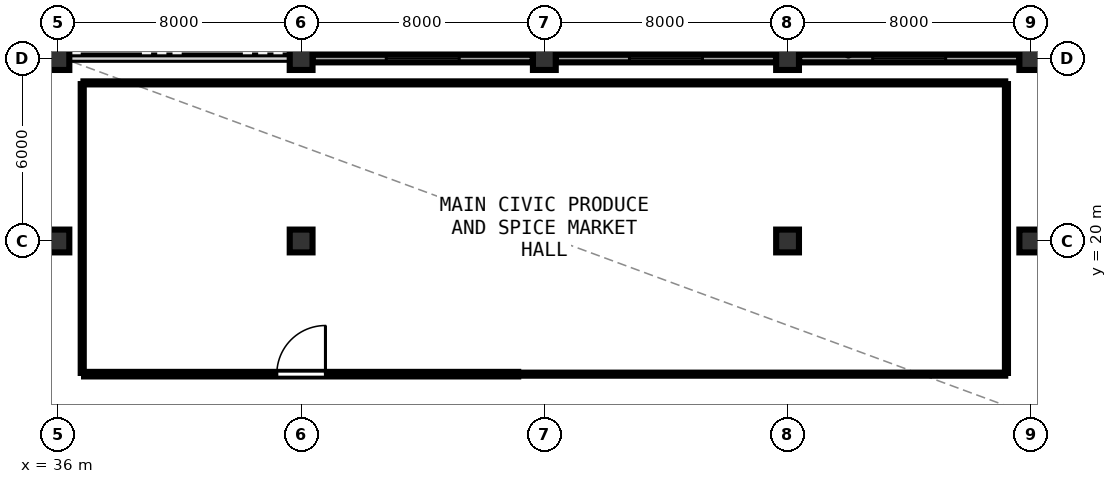
"""IFC4 building model, lengths in metres.
Left out: names, types, materials, properties, quantities, classifications, styles, units other than length and angle.
Written with IfcOpenShell. Run it as: python <this file> out.ifc"""

import sys

from ifc_helpers import new_model, si_unit, direction, frame, frame_2d, origin, origin_2d, place, context, subcontext, project, spatial, rectangle, extrude, element, fill, save


model = new_model("IFC4")
c1 = context("Model", 3, precision=1e-05, world=origin(), true_north=direction((0.0, 1.0)))
c2 = subcontext(c1, "Body", "Model", "MODEL_VIEW")
j1 = project(units=[si_unit("LENGTHUNIT", "METRE"), si_unit("PLANEANGLEUNIT", "RADIAN")], contexts=[c1])
p1 = place(None, origin())
s1 = spatial("IfcSite", under=j1, at=p1, CompositionType="ELEMENT")
p2 = place(p1, origin())
s2 = spatial("IfcBuilding", under=s1, at=p2, CompositionType="ELEMENT")
p3 = place(p2, origin())
s3 = spatial("IfcBuildingStorey", under=s2, at=p3, CompositionType="ELEMENT", Elevation=0.0)
for number, where, z_axis, x_axis in (
    (1, (36.0, 20.0, 0.0), (0.0, 0.0, 1.0), (1.0, 0.0, 0.0)),
    (2, (36.0, 26.0, 0.0), (0.0, 0.0, 1.0), (1.0, 0.0, 0.0)),
    (3, (44.0, 20.0, 0.0), (0.0, 0.0, 1.0), (1.0, 0.0, 0.0)),
    (4, (44.0, 26.0, 0.0), (0.0, 0.0, 1.0), (1.0, 0.0, 0.0)),
    (5, (52.0, 20.0, 0.0), (0.0, 0.0, 1.0), (1.0, 0.0, 0.0)),
    (6, (52.0, 26.0, 0.0), (0.0, 0.0, 1.0), (1.0, 0.0, 0.0)),
    (7, (60.0, 20.0, 0.0), (0.0, 0.0, 1.0), (1.0, 0.0, 0.0)),
    (8, (60.0, 26.0, 0.0), (0.0, 0.0, 1.0), (1.0, 0.0, 0.0)),
    (9, (68.0, 20.0, 0.0), (0.0, 0.0, 1.0), (1.0, 0.0, 0.0)),
    (10, (68.0, 26.0, 0.0), (0.0, 0.0, 1.0), (1.0, 0.0, 0.0)),
):
    element("IfcColumn", number, at=place(p3, frame(where, z_axis=z_axis, x_axis=x_axis)), inside=s3, PredefinedType="COLUMN", context=c2, shape_type="SweptSolid", body=[
        extrude(rectangle(XDim=0.75, YDim=0.75, at=origin_2d()), origin(), (0.0, 0.0, 1.0), 4.5),
    ])
p4 = place(p3, frame((67.62, 26.0, 0.0), z_axis=(0.0, 0.0, 1.0), x_axis=(-1.0, 0.0, 0.0)))
e11 = element("IfcWall", 11, at=p4, inside=s3, PredefinedType="SOLIDWALL", context=c2, shape_type="SweptSolid", body=[
    extrude(rectangle(XDim=7.24, YDim=0.25, at=frame_2d((3.62, 0.0))), origin(), (0.0, 0.0, 1.0), 3.42),
])
p5 = place(p4, frame((2.42, 0.0, 0.95)))
e12 = element("IfcOpeningElement", 12, at=p5, cuts=e11, PredefinedType="OPENING", context=c2, shape_type="SweptSolid", body=[
    extrude(rectangle(XDim=2.4, YDim=1.65, at=frame_2d((1.2, 0.825))), frame((0.0, 0.135, 0.0), z_axis=(0.0, -1.0, 0.0), x_axis=(1.0, 0.0, 0.0)), (0.0, 0.0, 1.0), 0.27),
])
p6 = place(p3, frame((59.62, 26.0, 0.0), z_axis=(0.0, 0.0, 1.0), x_axis=(-1.0, 0.0, 0.0)))
e13 = element("IfcWall", 13, at=p6, inside=s3, PredefinedType="SOLIDWALL", context=c2, shape_type="SweptSolid", body=[
    extrude(rectangle(XDim=7.24, YDim=0.25, at=frame_2d((3.62, 0.0))), origin(), (0.0, 0.0, 1.0), 3.42),
])
p7 = place(p6, frame((2.42, 0.0, 0.95)))
e14 = element("IfcOpeningElement", 14, at=p7, cuts=e13, PredefinedType="OPENING", context=c2, shape_type="SweptSolid", body=[
    extrude(rectangle(XDim=2.4, YDim=1.65, at=frame_2d((1.2, 0.825))), frame((0.0, 0.135, 0.0), z_axis=(0.0, -1.0, 0.0), x_axis=(1.0, 0.0, 0.0)), (0.0, 0.0, 1.0), 0.27),
])
p8 = place(p3, frame((51.62, 26.0, 0.0), z_axis=(0.0, 0.0, 1.0), x_axis=(-1.0, 0.0, 0.0)))
e15 = element("IfcWall", 15, at=p8, inside=s3, PredefinedType="SOLIDWALL", context=c2, shape_type="SweptSolid", body=[
    extrude(rectangle(XDim=7.24, YDim=0.25, at=frame_2d((3.62, 0.0))), origin(), (0.0, 0.0, 1.0), 3.42),
])
p9 = place(p8, frame((2.42, 0.0, 0.95)))
e16 = element("IfcOpeningElement", 16, at=p9, cuts=e15, PredefinedType="OPENING", context=c2, shape_type="SweptSolid", body=[
    extrude(rectangle(XDim=2.4, YDim=1.65, at=frame_2d((1.2, 0.825))), frame((0.0, 0.135, 0.0), z_axis=(0.0, -1.0, 0.0), x_axis=(1.0, 0.0, 0.0)), (0.0, 0.0, 1.0), 0.27),
])
p10 = place(p3, frame((36.86, 15.62, 0.0), z_axis=(0.0, 0.0, 1.0), x_axis=(1.0, 0.0, 0.0)))
e17 = element("IfcWall", 17, at=p10, inside=s3, PredefinedType="PARTITIONING", context=c2, shape_type="SweptSolid", body=[
    extrude(rectangle(XDim=14.28, YDim=0.15, at=frame_2d((7.14, 0.0))), origin(), (0.0, 0.0, 1.0), 3.425),
])
p11 = place(p10, frame((6.34, 0.0, 0.0)))
e18 = element("IfcOpeningElement", 18, at=p11, cuts=e17, PredefinedType="OPENING", context=c2, shape_type="SweptSolid", body=[
    extrude(rectangle(XDim=1.6, YDim=2.15, at=frame_2d((0.8, 1.075))), frame((0.0, 0.085, 0.0), z_axis=(0.0, -1.0, 0.0), x_axis=(1.0, 0.0, 0.0)), (0.0, 0.0, 1.0), 0.17),
])
p12 = place(p3, frame((51.14, 15.62, 0.0), z_axis=(0.0, 0.0, 1.0), x_axis=(1.0, 0.0, 0.0)))
e19 = element("IfcWall", 19, at=p12, inside=s3, PredefinedType="PARTITIONING", context=c2, shape_type="SweptSolid", body=[
    extrude(rectangle(XDim=16.02, YDim=0.1, at=frame_2d((8.01, 0.0))), origin(), (0.0, 0.0, 1.0), 3.425),
])
p13 = place(p3, frame((67.2, 15.66, 0.0), z_axis=(0.0, 0.0, 1.0), x_axis=(0.0, 1.0, 0.0)))
e20 = element("IfcWall", 20, at=p13, inside=s3, PredefinedType="PARTITIONING", context=c2, shape_type="SweptSolid", body=[
    extrude(rectangle(XDim=9.5, YDim=0.1, at=frame_2d((4.75, 0.0))), origin(), (0.0, 0.0, 1.0), 3.425),
])
p14 = place(p3, frame((67.16, 25.2, 0.0), z_axis=(0.0, 0.0, 1.0), x_axis=(-1.0, 0.0, 0.0)))
e21 = element("IfcWall", 21, at=p14, inside=s3, PredefinedType="PARTITIONING", context=c2, shape_type="SweptSolid", body=[
    extrude(rectangle(XDim=30.32, YDim=0.1, at=frame_2d((15.16, 0.0))), origin(), (0.0, 0.0, 1.0), 3.425),
])
p15 = place(p3, frame((36.8, 25.16, 0.0), z_axis=(0.0, 0.0, 1.0), x_axis=(0.0, -1.0, 0.0)))
e22 = element("IfcWall", 22, at=p15, inside=s3, PredefinedType="PARTITIONING", context=c2, shape_type="SweptSolid", body=[
    extrude(rectangle(XDim=9.5, YDim=0.1, at=frame_2d((4.75, 0.0))), origin(), (0.0, 0.0, 1.0), 3.425),
])
p16 = place(p5, origin())
e23 = element("IfcWindow", 23, at=p16, inside=s3, PartitioningType="SINGLE_PANEL", PredefinedType="WINDOW", context=c2, shape_type="SweptSolid", body=[
    extrude(rectangle(XDim=2.4, YDim=1.65, at=frame_2d((1.2, 0.825))), frame((0.0, 0.03, 0.0), z_axis=(0.0, -1.0, 0.0), x_axis=(1.0, 0.0, 0.0)), (0.0, 0.0, 1.0), 0.06),
])
fill(e12, e23)
p17 = place(p7, origin())
e24 = element("IfcWindow", 24, at=p17, inside=s3, PartitioningType="SINGLE_PANEL", PredefinedType="WINDOW", context=c2, shape_type="SweptSolid", body=[
    extrude(rectangle(XDim=2.4, YDim=1.65, at=frame_2d((1.2, 0.825))), frame((0.0, 0.03, 0.0), z_axis=(0.0, -1.0, 0.0), x_axis=(1.0, 0.0, 0.0)), (0.0, 0.0, 1.0), 0.06),
])
fill(e14, e24)
p18 = place(p9, origin())
e25 = element("IfcWindow", 25, at=p18, inside=s3, PartitioningType="SINGLE_PANEL", PredefinedType="WINDOW", context=c2, shape_type="SweptSolid", body=[
    extrude(rectangle(XDim=2.4, YDim=1.65, at=frame_2d((1.2, 0.825))), frame((0.0, 0.03, 0.0), z_axis=(0.0, -1.0, 0.0), x_axis=(1.0, 0.0, 0.0)), (0.0, 0.0, 1.0), 0.06),
])
fill(e16, e25)
p19 = place(p11, origin())
e26 = element("IfcDoor", 26, at=p19, inside=s3, OperationType="SINGLE_SWING_RIGHT", PredefinedType="DOOR", context=c2, shape_type="SweptSolid", body=[
    extrude(rectangle(XDim=1.6, YDim=2.15, at=frame_2d((0.8, 1.075))), frame((0.0, 0.025, 0.0), z_axis=(0.0, -1.0, 0.0), x_axis=(1.0, 0.0, 0.0)), (0.0, 0.0, 1.0), 0.05),
])
fill(e18, e26)
save(model, sys.argv[1])
